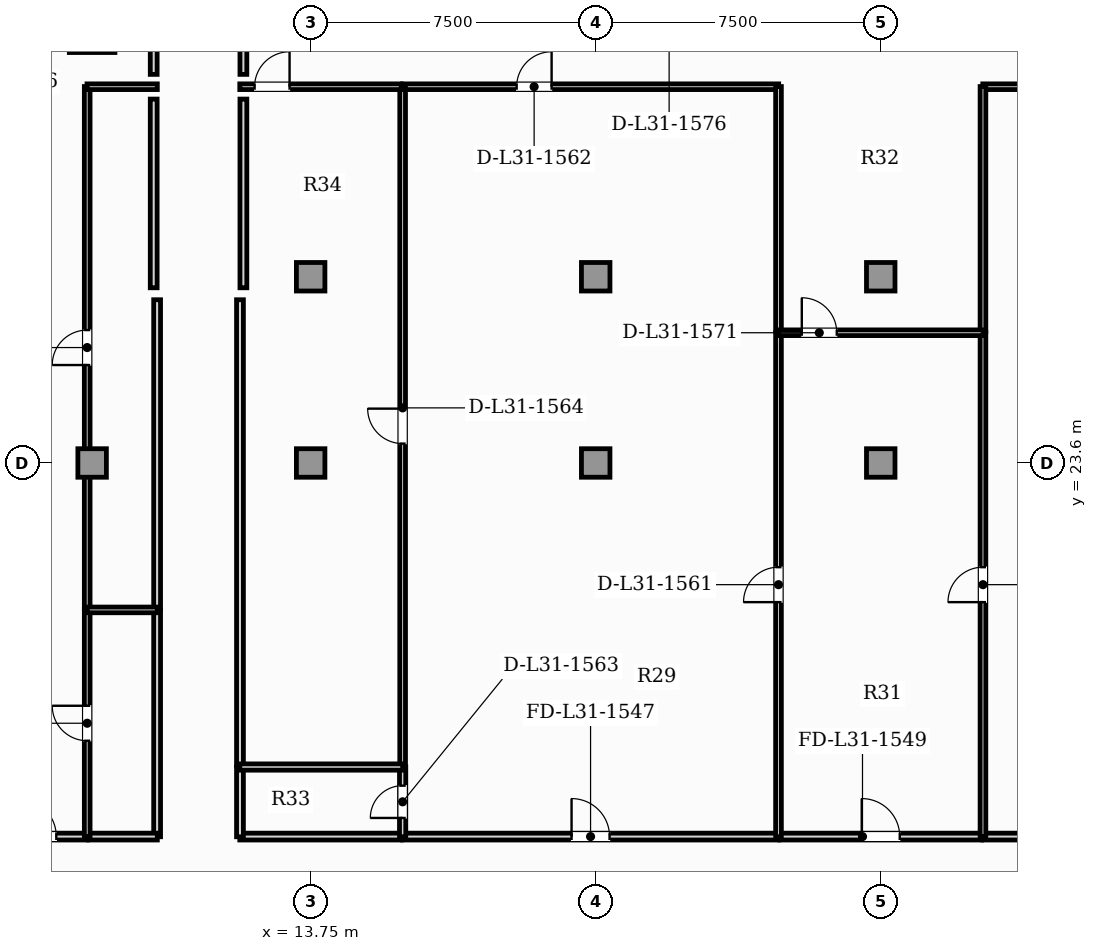
"""IFC4 building model, lengths in metres.
Left out: names, types, materials, properties, quantities, classifications, styles, units other than length and angle.
Written with IfcOpenShell. Run it as: python <this file> out.ifc"""

import sys

from ifc_helpers import new_model, si_unit, direction, frame, frame_2d, origin, origin_2d, place, context, subcontext, project, spatial, rectangle, hollow_rectangle, extrude, element, fill, save


model = new_model("IFC4")
c1 = context("Model", 3, precision=1e-05, world=origin(), true_north=direction((0.0, 1.0)))
c2 = subcontext(c1, "Body", "Model", "MODEL_VIEW")
j1 = project(units=[si_unit("LENGTHUNIT", "METRE"), si_unit("PLANEANGLEUNIT", "RADIAN")], contexts=[c1])
p1 = place(None, origin())
s1 = spatial("IfcSite", under=j1, at=p1, CompositionType="ELEMENT")
p2 = place(p1, origin())
s2 = spatial("IfcBuilding", under=s1, at=p2, CompositionType="ELEMENT")
p3 = place(p2, frame((0.0, 0.0, 127.25)))
s3 = spatial("IfcBuildingStorey", under=s2, at=p3, CompositionType="ELEMENT", Elevation=127.25)
p4 = place(p3, frame((8.0, 35.0, 0.0), z_axis=(0.0, 0.0, 1.0), x_axis=(1.0, 0.0, 0.0)))
e1 = element("IfcColumn", 1, at=p4, inside=s3, PredefinedType="USERDEFINED", context=c2, shape_type="SweptSolid", body=[
    extrude(hollow_rectangle(XDim=1.2, YDim=1.2, WallThickness=0.07, at=origin_2d()), origin(), (0.0, 0.0, 1.0), 3.85),
])
for number, where, z_axis, x_axis in (
    (2, (8.0, 23.6, 0.0), (0.0, 0.0, 1.0), (1.0, 0.0, 0.0)),
    (3, (13.75, 23.6, 0.0), (0.0, 0.0, 1.0), (1.0, 0.0, 0.0)),
    (4, (21.25, 23.6, 0.0), (0.0, 0.0, 1.0), (1.0, 0.0, 0.0)),
    (5, (28.75, 23.6, 0.0), (0.0, 0.0, 1.0), (1.0, 0.0, 0.0)),
    (6, (13.75, 28.5, 0.0), (0.0, 0.0, 1.0), (1.0, 0.0, 0.0)),
    (7, (21.25, 28.5, 0.0), (0.0, 0.0, 1.0), (1.0, 0.0, 0.0)),
    (8, (28.75, 28.5, 0.0), (0.0, 0.0, 1.0), (1.0, 0.0, 0.0)),
):
    element("IfcColumn", number, at=place(p3, frame(where, z_axis=z_axis, x_axis=x_axis)), inside=s3, PredefinedType="COLUMN", context=c2, shape_type="SweptSolid", body=[
        extrude(rectangle(XDim=0.75, YDim=0.75, at=origin_2d()), origin(), (0.0, 0.0, 1.0), 3.85),
    ])
p5 = place(p3, frame((5.239, 13.77, 0.0), z_axis=(0.0, 0.0, 1.0), x_axis=(1.0, 0.0, 0.0)))
e9 = element("IfcWall", 9, at=p5, inside=s3, PredefinedType="PARTITIONING", context=c2, shape_type="SweptSolid", body=[
    extrude(rectangle(XDim=2.636, YDim=0.18, at=frame_2d((1.318, 0.0))), origin(), (0.0, 0.0, 1.0), 3.6),
])
p6 = place(p5, frame((0.818, 0.0, 0.0)))
e10 = element("IfcOpeningElement", 10, at=p6, cuts=e9, PredefinedType="OPENING", context=c2, shape_type="SweptSolid", body=[
    extrude(rectangle(XDim=1.0, YDim=2.15, at=frame_2d((0.5, 1.075))), frame((0.0, 0.1, 0.0), z_axis=(0.0, -1.0, 0.0), x_axis=(1.0, 0.0, 0.0)), (0.0, 0.0, 1.0), 0.2),
])
p7 = place(p3, frame((9.71, 13.765, 0.0), z_axis=(0.0, 0.0, 1.0), x_axis=(0.0, 1.0, 0.0)))
e11 = element("IfcWall", 11, at=p7, inside=s3, PredefinedType="PARTITIONING", context=c2, shape_type="SweptSolid", body=[
    extrude(rectangle(XDim=5.974, YDim=0.18, at=frame_2d((2.987, 0.0))), origin(), (0.0, 0.0, 1.0), 3.6),
])
p8 = place(p3, frame((7.905, 13.77, 0.0), z_axis=(0.0, 0.0, 1.0), x_axis=(1.0, 0.0, 0.0)))
e12 = element("IfcWall", 12, at=p8, inside=s3, PredefinedType="PARTITIONING", context=c2, shape_type="SweptSolid", body=[
    extrude(rectangle(XDim=1.81, YDim=0.18, at=frame_2d((0.905, 0.0))), origin(), (0.0, 0.0, 1.0), 3.6),
])
p9 = place(p3, frame((9.71, 19.769, 0.0), z_axis=(0.0, 0.0, 1.0), x_axis=(0.0, 1.0, 0.0)))
e13 = element("IfcWall", 13, at=p9, inside=s3, PredefinedType="PARTITIONING", context=c2, shape_type="SweptSolid", body=[
    extrude(rectangle(XDim=8.126, YDim=0.18, at=frame_2d((4.063, 0.0))), origin(), (0.0, 0.0, 1.0), 3.6),
])
p10 = place(p3, frame((16.165, 13.77, 0.0), z_axis=(0.0, 0.0, 1.0), x_axis=(1.0, 0.0, 0.0)))
e14 = element("IfcWall", 14, at=p10, inside=s3, PredefinedType="PARTITIONING", context=c2, shape_type="SweptSolid", body=[
    extrude(rectangle(XDim=9.9, YDim=0.18, at=frame_2d((4.95, 0.0))), origin(), (0.0, 0.0, 1.0), 3.6),
])
p11 = place(p10, frame((4.45, 0.0, 0.0)))
e15 = element("IfcOpeningElement", 15, at=p11, cuts=e14, PredefinedType="OPENING", context=c2, shape_type="SweptSolid", body=[
    extrude(rectangle(XDim=1.0, YDim=2.15, at=frame_2d((0.5, 1.075))), frame((0.0, 0.1, 0.0), z_axis=(0.0, -1.0, 0.0), x_axis=(1.0, 0.0, 0.0)), (0.0, 0.0, 1.0), 0.2),
])
p12 = place(p3, frame((31.435, 13.77, 0.0), z_axis=(0.0, 0.0, 1.0), x_axis=(1.0, 0.0, 0.0)))
e16 = element("IfcWall", 16, at=p12, inside=s3, PredefinedType="PARTITIONING", context=c2, shape_type="SweptSolid", body=[
    extrude(rectangle(XDim=9.9, YDim=0.18, at=frame_2d((4.95, 0.0))), origin(), (0.0, 0.0, 1.0), 3.6),
])
p13 = place(p12, frame((4.45, 0.0, 0.0)))
e17 = element("IfcOpeningElement", 17, at=p13, cuts=e16, PredefinedType="OPENING", context=c2, shape_type="SweptSolid", body=[
    extrude(rectangle(XDim=1.0, YDim=2.15, at=frame_2d((0.5, 1.075))), frame((0.0, 0.1, 0.0), z_axis=(0.0, -1.0, 0.0), x_axis=(1.0, 0.0, 0.0)), (0.0, 0.0, 1.0), 0.2),
])
p14 = place(p3, frame((26.095, 13.77, 0.0), z_axis=(0.0, 0.0, 1.0), x_axis=(1.0, 0.0, 0.0)))
e18 = element("IfcWall", 18, at=p14, inside=s3, PredefinedType="PARTITIONING", context=c2, shape_type="SweptSolid", body=[
    extrude(rectangle(XDim=5.31, YDim=0.18, at=frame_2d((2.655, 0.0))), origin(), (0.0, 0.0, 1.0), 3.6),
])
p15 = place(p14, frame((2.155, 0.0, 0.0)))
e19 = element("IfcOpeningElement", 19, at=p15, cuts=e18, PredefinedType="OPENING", context=c2, shape_type="SweptSolid", body=[
    extrude(rectangle(XDim=1.0, YDim=2.15, at=frame_2d((0.5, 1.075))), frame((0.0, 0.1, 0.0), z_axis=(0.0, -1.0, 0.0), x_axis=(1.0, 0.0, 0.0)), (0.0, 0.0, 1.0), 0.2),
])
p16 = place(p3, frame((11.885, 13.77, 0.0), z_axis=(0.0, 0.0, 1.0), x_axis=(1.0, 0.0, 0.0)))
e20 = element("IfcWall", 20, at=p16, inside=s3, PredefinedType="PARTITIONING", context=c2, shape_type="SweptSolid", body=[
    extrude(rectangle(XDim=4.25, YDim=0.18, at=frame_2d((2.125, 0.0))), origin(), (0.0, 0.0, 1.0), 3.6),
])
p17 = place(p3, frame((11.89, 13.765, 0.0), z_axis=(0.0, 0.0, 1.0), x_axis=(0.0, 1.0, 0.0)))
e21 = element("IfcWall", 21, at=p17, inside=s3, PredefinedType="PARTITIONING", context=c2, shape_type="SweptSolid", body=[
    extrude(rectangle(XDim=1.84, YDim=0.18, at=frame_2d((0.92, 0.0))), origin(), (0.0, 0.0, 1.0), 3.6),
])
p18 = place(p3, frame((11.89, 15.635, 0.0), z_axis=(0.0, 0.0, 1.0), x_axis=(0.0, 1.0, 0.0)))
e22 = element("IfcWall", 22, at=p18, inside=s3, PredefinedType="PARTITIONING", context=c2, shape_type="SweptSolid", body=[
    extrude(rectangle(XDim=12.26, YDim=0.18, at=frame_2d((6.13, 0.0))), origin(), (0.0, 0.0, 1.0), 3.6),
])
p19 = place(p3, frame((7.87, 13.765, 0.0), z_axis=(0.0, 0.0, 1.0), x_axis=(0.0, 1.0, 0.0)))
e23 = element("IfcWall", 23, at=p19, inside=s3, PredefinedType="PARTITIONING", context=c2, shape_type="SweptSolid", body=[
    extrude(rectangle(XDim=5.974, YDim=0.15, at=frame_2d((2.987, 0.0))), origin(), (0.0, 0.0, 1.0), 3.055),
])
p20 = place(p19, frame((2.527, 0.0, 0.0)))
e24 = element("IfcOpeningElement", 24, at=p20, cuts=e23, PredefinedType="OPENING", context=c2, shape_type="SweptSolid", body=[
    extrude(rectangle(XDim=0.92, YDim=2.1, at=frame_2d((0.46, 1.05))), frame((0.0, 0.085, 0.0), z_axis=(0.0, -1.0, 0.0), x_axis=(1.0, 0.0, 0.0)), (0.0, 0.0, 1.0), 0.17),
])
p21 = place(p3, frame((7.87, 19.769, 0.0), z_axis=(0.0, 0.0, 1.0), x_axis=(0.0, 1.0, 0.0)))
e25 = element("IfcWall", 25, at=p21, inside=s3, PredefinedType="PARTITIONING", context=c2, shape_type="SweptSolid", body=[
    extrude(rectangle(XDim=13.736, YDim=0.15, at=frame_2d((6.868, 0.0))), origin(), (0.0, 0.0, 1.0), 3.055),
])
p22 = place(p21, frame((6.408, 0.0, 0.0)))
e26 = element("IfcOpeningElement", 26, at=p22, cuts=e25, PredefinedType="OPENING", context=c2, shape_type="SweptSolid", body=[
    extrude(rectangle(XDim=0.92, YDim=2.1, at=frame_2d((0.46, 1.05))), frame((0.0, 0.085, 0.0), z_axis=(0.0, -1.0, 0.0), x_axis=(1.0, 0.0, 0.0)), (0.0, 0.0, 1.0), 0.17),
])
for number, where, z_axis, x_axis in (
    (27, (7.865, 33.5, 0.0), (0.0, 0.0, 1.0), (1.0, 0.0, 0.0)),
    (28, (7.865, 19.734, 0.0), (0.0, 0.0, 1.0), (1.0, 0.0, 0.0)),
):
    element("IfcWall", number, at=place(p3, frame(where, z_axis=z_axis, x_axis=x_axis)), inside=s3, PredefinedType="PARTITIONING", context=c2, shape_type="SweptSolid", body=[
        extrude(rectangle(XDim=1.85, YDim=0.15, at=frame_2d((0.925, 0.0))), origin(), (0.0, 0.0, 1.0), 3.6),
    ])
p23 = place(p3, frame((26.06, 13.765, 0.0), z_axis=(0.0, 0.0, 1.0), x_axis=(0.0, 1.0, 0.0)))
e29 = element("IfcWall", 29, at=p23, inside=s3, PredefinedType="PARTITIONING", context=c2, shape_type="SweptSolid", body=[
    extrude(rectangle(XDim=13.267, YDim=0.15, at=frame_2d((6.634, 0.0))), origin(), (0.0, 0.0, 1.0), 3.6),
])
p24 = place(p23, frame((6.173, 0.0, 0.0)))
e30 = element("IfcOpeningElement", 30, at=p24, cuts=e29, PredefinedType="OPENING", context=c2, shape_type="SweptSolid", body=[
    extrude(rectangle(XDim=0.92, YDim=2.1, at=frame_2d((0.46, 1.05))), frame((0.0, 0.085, 0.0), z_axis=(0.0, -1.0, 0.0), x_axis=(1.0, 0.0, 0.0)), (0.0, 0.0, 1.0), 0.17),
])
p25 = place(p3, frame((16.165, 33.5, 0.0), z_axis=(0.0, 0.0, 1.0), x_axis=(1.0, 0.0, 0.0)))
e31 = element("IfcWall", 31, at=p25, inside=s3, PredefinedType="PARTITIONING", context=c2, shape_type="SweptSolid", body=[
    extrude(rectangle(XDim=9.9, YDim=0.15, at=frame_2d((4.95, 0.0))), origin(), (0.0, 0.0, 1.0), 3.6),
])
p26 = place(p25, frame((3.005, 0.0, 0.0)))
e32 = element("IfcOpeningElement", 32, at=p26, cuts=e31, PredefinedType="OPENING", context=c2, shape_type="SweptSolid", body=[
    extrude(rectangle(XDim=0.92, YDim=2.1, at=frame_2d((0.46, 1.05))), frame((0.0, 0.085, 0.0), z_axis=(0.0, -1.0, 0.0), x_axis=(1.0, 0.0, 0.0)), (0.0, 0.0, 1.0), 0.17),
])
p27 = place(p3, frame((26.06, 27.062, 0.0), z_axis=(0.0, 0.0, 1.0), x_axis=(0.0, 1.0, 0.0)))
e33 = element("IfcWall", 33, at=p27, inside=s3, PredefinedType="PARTITIONING", context=c2, shape_type="SweptSolid", body=[
    extrude(rectangle(XDim=6.443, YDim=0.15, at=frame_2d((3.221, 0.0))), origin(), (0.0, 0.0, 1.0), 3.6),
])
p28 = place(p3, frame((16.17, 13.765, 0.0), z_axis=(0.0, 0.0, 1.0), x_axis=(0.0, 1.0, 0.0)))
e34 = element("IfcWall", 34, at=p28, inside=s3, PredefinedType="PLUMBINGWALL", context=c2, shape_type="SweptSolid", body=[
    extrude(rectangle(XDim=1.84, YDim=0.165, at=frame_2d((0.92, 0.0))), origin(), (0.0, 0.0, 1.0), 3.6),
])
p29 = place(p28, frame((0.495, 0.0, 0.0)))
e35 = element("IfcOpeningElement", 35, at=p29, cuts=e34, PredefinedType="OPENING", context=c2, shape_type="SweptSolid", body=[
    extrude(rectangle(XDim=0.85, YDim=2.1, at=frame_2d((0.425, 1.05))), frame((0.0, 0.093, 0.0), z_axis=(0.0, -1.0, 0.0), x_axis=(1.0, 0.0, 0.0)), (0.0, 0.0, 1.0), 0.185),
])
p30 = place(p3, frame((16.17, 15.635, 0.0), z_axis=(0.0, 0.0, 1.0), x_axis=(0.0, 1.0, 0.0)))
e36 = element("IfcWall", 36, at=p30, inside=s3, PredefinedType="PARTITIONING", context=c2, shape_type="SweptSolid", body=[
    extrude(rectangle(XDim=17.87, YDim=0.15, at=frame_2d((8.935, 0.0))), origin(), (0.0, 0.0, 1.0), 3.6),
])
p31 = place(p30, frame((8.475, 0.0, 0.0)))
e37 = element("IfcOpeningElement", 37, at=p31, cuts=e36, PredefinedType="OPENING", context=c2, shape_type="SweptSolid", body=[
    extrude(rectangle(XDim=0.92, YDim=2.1, at=frame_2d((0.46, 1.05))), frame((0.0, 0.085, 0.0), z_axis=(0.0, -1.0, 0.0), x_axis=(1.0, 0.0, 0.0)), (0.0, 0.0, 1.0), 0.17),
])
p32 = place(p3, frame((31.44, 13.765, 0.0), z_axis=(0.0, 0.0, 1.0), x_axis=(0.0, 1.0, 0.0)))
e38 = element("IfcWall", 38, at=p32, inside=s3, PredefinedType="PARTITIONING", context=c2, shape_type="SweptSolid", body=[
    extrude(rectangle(XDim=13.267, YDim=0.15, at=frame_2d((6.634, 0.0))), origin(), (0.0, 0.0, 1.0), 3.6),
])
p33 = place(p32, frame((6.173, 0.0, 0.0)))
e39 = element("IfcOpeningElement", 39, at=p33, cuts=e38, PredefinedType="OPENING", context=c2, shape_type="SweptSolid", body=[
    extrude(rectangle(XDim=0.92, YDim=2.1, at=frame_2d((0.46, 1.05))), frame((0.0, 0.085, 0.0), z_axis=(0.0, -1.0, 0.0), x_axis=(1.0, 0.0, 0.0)), (0.0, 0.0, 1.0), 0.17),
])
p34 = place(p3, frame((31.435, 33.5, 0.0), z_axis=(0.0, 0.0, 1.0), x_axis=(1.0, 0.0, 0.0)))
e40 = element("IfcWall", 40, at=p34, inside=s3, PredefinedType="PARTITIONING", context=c2, shape_type="SweptSolid", body=[
    extrude(rectangle(XDim=9.9, YDim=0.15, at=frame_2d((4.95, 0.0))), origin(), (0.0, 0.0, 1.0), 3.6),
])
p35 = place(p34, frame((3.005, 0.0, 0.0)))
e41 = element("IfcOpeningElement", 41, at=p35, cuts=e40, PredefinedType="OPENING", context=c2, shape_type="SweptSolid", body=[
    extrude(rectangle(XDim=0.92, YDim=2.1, at=frame_2d((0.46, 1.05))), frame((0.0, 0.085, 0.0), z_axis=(0.0, -1.0, 0.0), x_axis=(1.0, 0.0, 0.0)), (0.0, 0.0, 1.0), 0.17),
])
p36 = place(p3, frame((31.44, 27.062, 0.0), z_axis=(0.0, 0.0, 1.0), x_axis=(0.0, 1.0, 0.0)))
e42 = element("IfcWall", 42, at=p36, inside=s3, PredefinedType="PARTITIONING", context=c2, shape_type="SweptSolid", body=[
    extrude(rectangle(XDim=6.443, YDim=0.15, at=frame_2d((3.221, 0.0))), origin(), (0.0, 0.0, 1.0), 3.6),
])
p37 = place(p3, frame((26.055, 27.027, 0.0), z_axis=(0.0, 0.0, 1.0), x_axis=(1.0, 0.0, 0.0)))
e43 = element("IfcWall", 43, at=p37, inside=s3, PredefinedType="PARTITIONING", context=c2, shape_type="SweptSolid", body=[
    extrude(rectangle(XDim=5.39, YDim=0.15, at=frame_2d((2.695, 0.0))), origin(), (0.0, 0.0, 1.0), 3.6),
])
p38 = place(p37, frame((0.618, 0.0, 0.0)))
e44 = element("IfcOpeningElement", 44, at=p38, cuts=e43, PredefinedType="OPENING", context=c2, shape_type="SweptSolid", body=[
    extrude(rectangle(XDim=0.92, YDim=2.1, at=frame_2d((0.46, 1.05))), frame((0.0, 0.085, 0.0), z_axis=(0.0, -1.0, 0.0), x_axis=(1.0, 0.0, 0.0)), (0.0, 0.0, 1.0), 0.17),
])
p39 = place(p3, frame((11.885, 33.5, 0.0), z_axis=(0.0, 0.0, 1.0), x_axis=(1.0, 0.0, 0.0)))
e45 = element("IfcWall", 45, at=p39, inside=s3, PredefinedType="PARTITIONING", context=c2, shape_type="SweptSolid", body=[
    extrude(rectangle(XDim=4.25, YDim=0.15, at=frame_2d((2.125, 0.0))), origin(), (0.0, 0.0, 1.0), 3.6),
])
p40 = place(p39, frame((0.39, 0.0, 0.0)))
e46 = element("IfcOpeningElement", 46, at=p40, cuts=e45, PredefinedType="OPENING", context=c2, shape_type="SweptSolid", body=[
    extrude(rectangle(XDim=0.92, YDim=2.1, at=frame_2d((0.46, 1.05))), frame((0.0, 0.085, 0.0), z_axis=(0.0, -1.0, 0.0), x_axis=(1.0, 0.0, 0.0)), (0.0, 0.0, 1.0), 0.17),
])
p41 = place(p3, frame((11.885, 15.6, 0.0), z_axis=(0.0, 0.0, 1.0), x_axis=(1.0, 0.0, 0.0)))
e47 = element("IfcWall", 47, at=p41, inside=s3, PredefinedType="PLUMBINGWALL", context=c2, shape_type="SweptSolid", body=[
    extrude(rectangle(XDim=4.29, YDim=0.165, at=frame_2d((2.145, 0.0))), origin(), (0.0, 0.0, 1.0), 3.6),
])
p42 = place(p3, frame((9.62, 34.675, 0.0), z_axis=(0.0, 0.0, 1.0), x_axis=(0.0, -1.0, 0.0)))
e48 = element("IfcWall", 48, at=p42, inside=s3, PredefinedType="PARTITIONING", context=c2, shape_type="SweptSolid", body=[
    extrude(rectangle(XDim=0.85, YDim=0.18, at=frame_2d((0.425, 0.0))), origin(), (0.0, 0.0, 1.0), 3.6),
])
p43 = place(p3, frame((9.62, 33.175, 0.0), z_axis=(0.0, 0.0, 1.0), x_axis=(0.0, -1.0, 0.0)))
e49 = element("IfcWall", 49, at=p43, inside=s3, PredefinedType="PARTITIONING", context=c2, shape_type="SweptSolid", body=[
    extrude(rectangle(XDim=4.965, YDim=0.18, at=frame_2d((2.482, 0.0))), origin(), (0.0, 0.0, 1.0), 3.6),
])
p44 = place(p3, frame((11.98, 33.825, 0.0), z_axis=(0.0, 0.0, 1.0), x_axis=(0.0, 1.0, 0.0)))
e50 = element("IfcWall", 50, at=p44, inside=s3, PredefinedType="PARTITIONING", context=c2, shape_type="SweptSolid", body=[
    extrude(rectangle(XDim=0.85, YDim=0.18, at=frame_2d((0.425, 0.0))), origin(), (0.0, 0.0, 1.0), 3.6),
])
p45 = place(p3, frame((11.98, 28.21, 0.0), z_axis=(0.0, 0.0, 1.0), x_axis=(0.0, 1.0, 0.0)))
e51 = element("IfcWall", 51, at=p45, inside=s3, PredefinedType="PARTITIONING", context=c2, shape_type="SweptSolid", body=[
    extrude(rectangle(XDim=4.965, YDim=0.18, at=frame_2d((2.482, 0.0))), origin(), (0.0, 0.0, 1.0), 3.6),
])
p46 = place(p6, origin())
e52 = element("IfcDoor", 52, at=p46, inside=s3, OperationType="SINGLE_SWING_LEFT", PredefinedType="DOOR", context=c2, shape_type="SweptSolid", body=[
    extrude(rectangle(XDim=1.0, YDim=2.15, at=frame_2d((0.5, 1.075))), frame((0.0, 0.025, 0.0), z_axis=(0.0, -1.0, 0.0), x_axis=(1.0, 0.0, 0.0)), (0.0, 0.0, 1.0), 0.05),
])
fill(e10, e52)
p47 = place(p11, origin())
e53 = element("IfcDoor", 53, at=p47, inside=s3, OperationType="SINGLE_SWING_LEFT", PredefinedType="DOOR", context=c2, shape_type="SweptSolid", body=[
    extrude(rectangle(XDim=1.0, YDim=2.15, at=frame_2d((0.5, 1.075))), frame((0.0, 0.025, 0.0), z_axis=(0.0, -1.0, 0.0), x_axis=(1.0, 0.0, 0.0)), (0.0, 0.0, 1.0), 0.05),
])
fill(e15, e53)
p48 = place(p15, origin())
e54 = element("IfcDoor", 54, at=p48, inside=s3, OperationType="SINGLE_SWING_LEFT", PredefinedType="DOOR", context=c2, shape_type="SweptSolid", body=[
    extrude(rectangle(XDim=1.0, YDim=2.15, at=frame_2d((0.5, 1.075))), frame((0.0, 0.025, 0.0), z_axis=(0.0, -1.0, 0.0), x_axis=(1.0, 0.0, 0.0)), (0.0, 0.0, 1.0), 0.05),
])
fill(e19, e54)
p49 = place(p20, origin())
e55 = element("IfcDoor", 55, at=p49, inside=s3, OperationType="SINGLE_SWING_RIGHT", PredefinedType="DOOR", context=c2, shape_type="SweptSolid", body=[
    extrude(rectangle(XDim=0.92, YDim=2.1, at=frame_2d((0.46, 1.05))), frame((0.0, 0.025, 0.0), z_axis=(0.0, -1.0, 0.0), x_axis=(1.0, 0.0, 0.0)), (0.0, 0.0, 1.0), 0.05),
])
fill(e24, e55)
p50 = place(p22, origin())
e56 = element("IfcDoor", 56, at=p50, inside=s3, OperationType="SINGLE_SWING_LEFT", PredefinedType="DOOR", context=c2, shape_type="SweptSolid", body=[
    extrude(rectangle(XDim=0.92, YDim=2.1, at=frame_2d((0.46, 1.05))), frame((0.0, 0.025, 0.0), z_axis=(0.0, -1.0, 0.0), x_axis=(1.0, 0.0, 0.0)), (0.0, 0.0, 1.0), 0.05),
])
fill(e26, e56)
p51 = place(p24, origin())
e57 = element("IfcDoor", 57, at=p51, inside=s3, OperationType="SINGLE_SWING_LEFT", PredefinedType="DOOR", context=c2, shape_type="SweptSolid", body=[
    extrude(rectangle(XDim=0.92, YDim=2.1, at=frame_2d((0.46, 1.05))), frame((0.0, 0.025, 0.0), z_axis=(0.0, -1.0, 0.0), x_axis=(1.0, 0.0, 0.0)), (0.0, 0.0, 1.0), 0.05),
])
fill(e30, e57)
p52 = place(p26, origin())
e58 = element("IfcDoor", 58, at=p52, inside=s3, OperationType="SINGLE_SWING_RIGHT", PredefinedType="DOOR", context=c2, shape_type="SweptSolid", body=[
    extrude(rectangle(XDim=0.92, YDim=2.1, at=frame_2d((0.46, 1.05))), frame((0.0, 0.025, 0.0), z_axis=(0.0, -1.0, 0.0), x_axis=(1.0, 0.0, 0.0)), (0.0, 0.0, 1.0), 0.05),
])
fill(e32, e58)
p53 = place(p29, origin())
e59 = element("IfcDoor", 59, at=p53, inside=s3, OperationType="SINGLE_SWING_LEFT", PredefinedType="DOOR", context=c2, shape_type="SweptSolid", body=[
    extrude(rectangle(XDim=0.85, YDim=2.1, at=frame_2d((0.425, 1.05))), frame((0.0, 0.025, 0.0), z_axis=(0.0, -1.0, 0.0), x_axis=(1.0, 0.0, 0.0)), (0.0, 0.0, 1.0), 0.05),
])
fill(e35, e59)
p54 = place(p31, origin())
e60 = element("IfcDoor", 60, at=p54, inside=s3, OperationType="SINGLE_SWING_RIGHT", PredefinedType="DOOR", context=c2, shape_type="SweptSolid", body=[
    extrude(rectangle(XDim=0.92, YDim=2.1, at=frame_2d((0.46, 1.05))), frame((0.0, 0.025, 0.0), z_axis=(0.0, -1.0, 0.0), x_axis=(1.0, 0.0, 0.0)), (0.0, 0.0, 1.0), 0.05),
])
fill(e37, e60)
p55 = place(p33, origin())
e61 = element("IfcDoor", 61, at=p55, inside=s3, OperationType="SINGLE_SWING_LEFT", PredefinedType="DOOR", context=c2, shape_type="SweptSolid", body=[
    extrude(rectangle(XDim=0.92, YDim=2.1, at=frame_2d((0.46, 1.05))), frame((0.0, 0.025, 0.0), z_axis=(0.0, -1.0, 0.0), x_axis=(1.0, 0.0, 0.0)), (0.0, 0.0, 1.0), 0.05),
])
fill(e39, e61)
p56 = place(p38, origin())
e62 = element("IfcDoor", 62, at=p56, inside=s3, OperationType="SINGLE_SWING_LEFT", PredefinedType="DOOR", context=c2, shape_type="SweptSolid", body=[
    extrude(rectangle(XDim=0.92, YDim=2.1, at=frame_2d((0.46, 1.05))), frame((0.0, 0.025, 0.0), z_axis=(0.0, -1.0, 0.0), x_axis=(1.0, 0.0, 0.0)), (0.0, 0.0, 1.0), 0.05),
])
fill(e44, e62)
p57 = place(p40, origin())
e63 = element("IfcDoor", 63, at=p57, inside=s3, OperationType="SINGLE_SWING_RIGHT", PredefinedType="DOOR", context=c2, shape_type="SweptSolid", body=[
    extrude(rectangle(XDim=0.92, YDim=2.1, at=frame_2d((0.46, 1.05))), frame((0.0, 0.025, 0.0), z_axis=(0.0, -1.0, 0.0), x_axis=(1.0, 0.0, 0.0)), (0.0, 0.0, 1.0), 0.05),
])
fill(e46, e63)
save(model, sys.argv[1])
